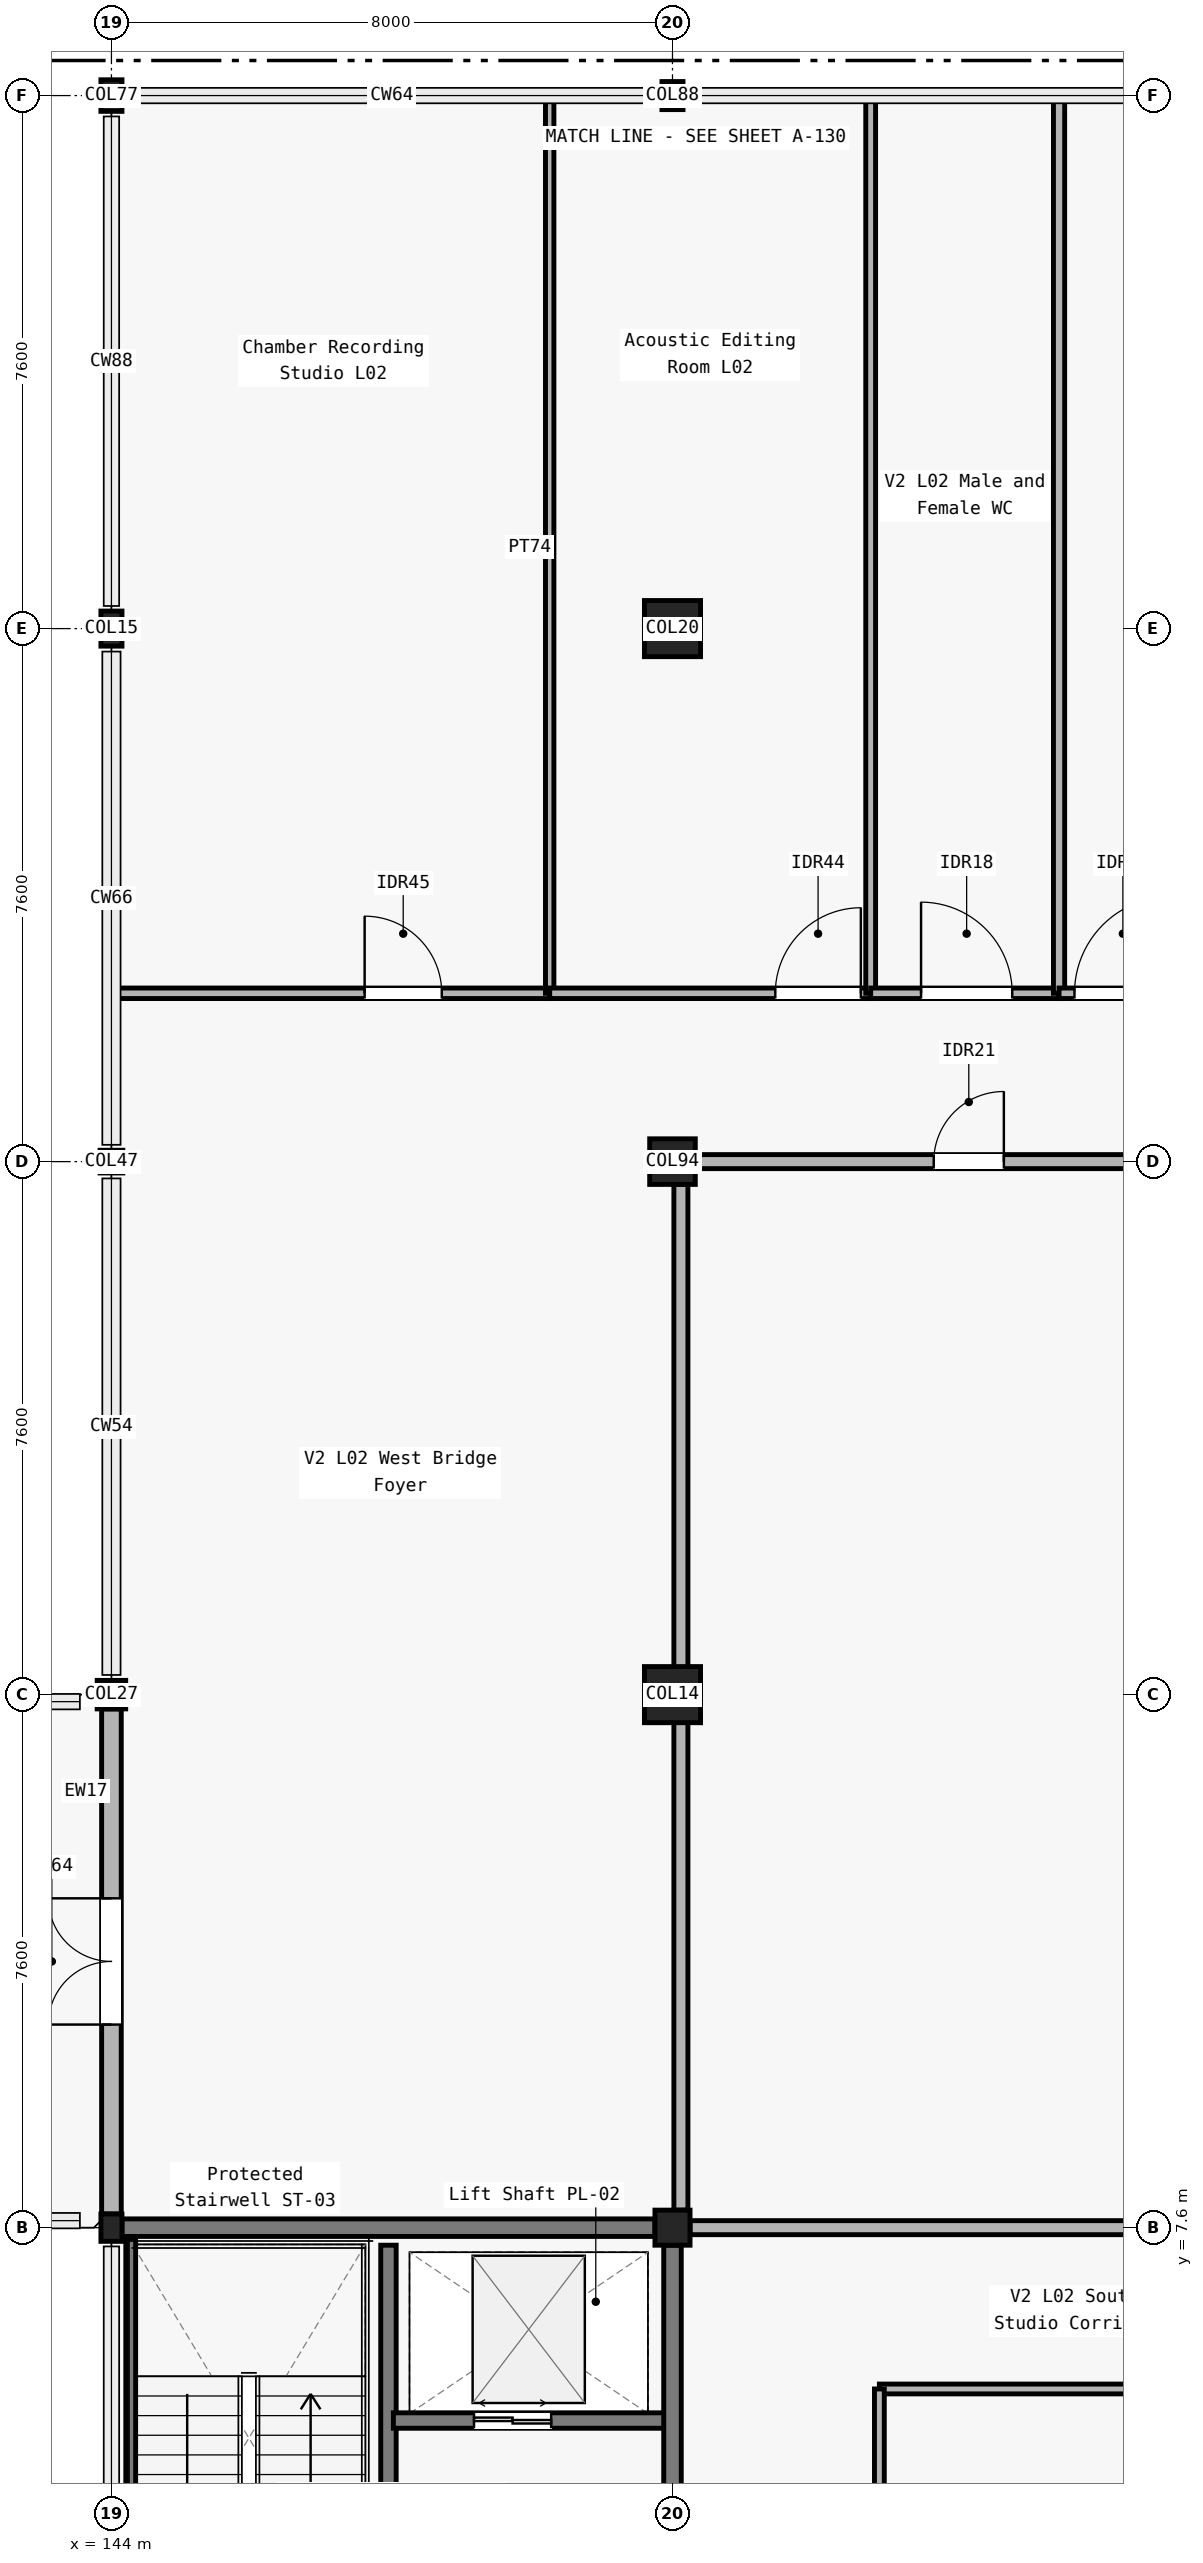
"""IFC4 building model, lengths in metres.
Left out: names, types, materials, properties, quantities, classifications, styles, units other than length and angle.
Written with IfcOpenShell. Run it as: python <this file> out.ifc"""

import sys

from ifc_helpers import new_model, si_unit, direction, frame, frame_2d, origin, origin_2d, place, context, subcontext, project, spatial, rectangle, circle, hollow_circle, i_section, extrude, element, fill, save


model = new_model("IFC4")
c1 = context("Model", 3, precision=1e-05, world=origin(), true_north=direction((0.0, 1.0)))
c2 = subcontext(c1, "Body", "Model", "MODEL_VIEW")
j1 = project(units=[si_unit("LENGTHUNIT", "METRE"), si_unit("PLANEANGLEUNIT", "RADIAN")], contexts=[c1])
p1 = place(None, origin())
s1 = spatial("IfcSite", under=j1, at=p1, CompositionType="ELEMENT")
p2 = place(p1, origin())
s2 = spatial("IfcBuilding", under=s1, at=p2, CompositionType="ELEMENT")
p3 = place(p2, frame((0.0, 0.0, 10.2)))
s3 = spatial("IfcBuildingStorey", under=s2, at=p3, CompositionType="ELEMENT", Elevation=10.2)
p4 = place(p3, frame((144.0, 7.6, 0.0), z_axis=(0.0, 0.0, 1.0), x_axis=(1.0, 0.0, 0.0)))
e1 = element("IfcColumn", 1, at=p4, inside=s3, PredefinedType="COLUMN", context=c2, shape_type="SweptSolid", body=[
    extrude(i_section(OverallWidth=0.3, OverallDepth=0.39, WebThickness=0.011, FlangeThickness=0.019, FilletRadius=0.027, at=origin_2d()), origin(), (0.0, 0.0, 1.0), 4.8),
])
p5 = place(p3, frame((144.0, 15.2, 0.0), z_axis=(0.0, 0.0, 1.0), x_axis=(1.0, 0.0, 0.0)))
e2 = element("IfcColumn", 2, at=p5, inside=s3, PredefinedType="COLUMN", context=c2, shape_type="SweptSolid", body=[
    extrude(hollow_circle(Radius=0.203, WallThickness=0.02, at=origin_2d()), origin(), (0.0, 0.0, 1.0), 4.8),
])
p6 = place(p3, frame((144.0, 22.8, 0.0), z_axis=(0.0, 0.0, 1.0), x_axis=(1.0, 0.0, 0.0)))
e3 = element("IfcColumn", 3, at=p6, inside=s3, PredefinedType="COLUMN", context=c2, shape_type="SweptSolid", body=[
    extrude(hollow_circle(Radius=0.162, WallThickness=0.016, at=origin_2d()), origin(), (0.0, 0.0, 1.0), 4.8),
])
p7 = place(p3, frame((144.0, 30.4, 0.0), z_axis=(0.0, 0.0, 1.0), x_axis=(1.0, 0.0, 0.0)))
e4 = element("IfcColumn", 4, at=p7, inside=s3, PredefinedType="COLUMN", context=c2, shape_type="SweptSolid", body=[
    extrude(i_section(OverallWidth=0.3, OverallDepth=0.5, WebThickness=0.014, FlangeThickness=0.028, FilletRadius=0.027, at=origin_2d()), origin(), (0.0, 0.0, 1.0), 4.8),
])
p8 = place(p3, frame((144.0, 38.0, 0.0), z_axis=(0.0, 0.0, 1.0), x_axis=(1.0, 0.0, 0.0)))
e5 = element("IfcColumn", 5, at=p8, inside=s3, PredefinedType="COLUMN", context=c2, shape_type="SweptSolid", body=[
    extrude(i_section(OverallWidth=0.3, OverallDepth=0.45, WebThickness=0.014, FlangeThickness=0.026, FilletRadius=0.027, at=origin_2d()), origin(), (0.0, 0.0, 1.0), 4.8),
])
p9 = place(p3, frame((152.0, 7.6, 0.0), z_axis=(0.0, 0.0, 1.0), x_axis=(1.0, 0.0, 0.0)))
e6 = element("IfcColumn", 6, at=p9, inside=s3, PredefinedType="COLUMN", context=c2, shape_type="SweptSolid", body=[
    extrude(rectangle(XDim=0.5, YDim=0.5, at=origin_2d()), origin(), (0.0, 0.0, 1.0), 4.8),
])
p10 = place(p3, frame((152.0, 15.2, 0.0), z_axis=(0.0, 0.0, 1.0), x_axis=(1.0, 0.0, 0.0)))
e7 = element("IfcColumn", 7, at=p10, inside=s3, PredefinedType="COLUMN", context=c2, shape_type="SweptSolid", body=[
    extrude(circle(Radius=0.4, at=origin_2d()), origin(), (0.0, 0.0, 1.0), 4.8),
])
p11 = place(p3, frame((152.0, 22.8, 0.0), z_axis=(0.0, 0.0, 1.0), x_axis=(1.0, 0.0, 0.0)))
e8 = element("IfcColumn", 8, at=p11, inside=s3, PredefinedType="COLUMN", context=c2, shape_type="SweptSolid", body=[
    extrude(circle(Radius=0.325, at=origin_2d()), origin(), (0.0, 0.0, 1.0), 4.8),
])
p12 = place(p3, frame((152.0, 30.4, 0.0), z_axis=(0.0, 0.0, 1.0), x_axis=(1.0, 0.0, 0.0)))
e9 = element("IfcColumn", 9, at=p12, inside=s3, PredefinedType="COLUMN", context=c2, shape_type="SweptSolid", body=[
    extrude(rectangle(XDim=0.8, YDim=0.8, at=origin_2d()), origin(), (0.0, 0.0, 1.0), 4.8),
])
p13 = place(p3, frame((152.0, 38.0, 0.0), z_axis=(0.0, 0.0, 1.0), x_axis=(1.0, 0.0, 0.0)))
e10 = element("IfcColumn", 10, at=p13, inside=s3, PredefinedType="COLUMN", context=c2, shape_type="SweptSolid", body=[
    extrude(i_section(OverallWidth=0.3, OverallDepth=0.4, WebThickness=0.013, FlangeThickness=0.024, FilletRadius=0.027, at=origin_2d()), origin(), (0.0, 0.0, 1.0), 4.8),
])
p14 = place(p3, frame((144.0, 7.795, 0.0), z_axis=(0.0, 0.0, 1.0), x_axis=(0.0, 1.0, 0.0)))
e11 = element("IfcWall", 11, at=p14, inside=s3, PredefinedType="SOLIDWALL", context=c2, shape_type="SweptSolid", body=[
    extrude(rectangle(XDim=7.202, YDim=0.28, at=frame_2d((3.601, 0.0))), origin(), (0.0, 0.0, 1.0), 3.86),
])
p15 = place(p14, frame((2.701, 0.0, 0.0)))
e12 = element("IfcOpeningElement", 12, at=p15, cuts=e11, PredefinedType="OPENING", context=c2, shape_type="SweptSolid", body=[
    extrude(rectangle(XDim=1.8, YDim=2.25, at=frame_2d((0.9, 1.125))), frame((0.0, 0.15, 0.0), z_axis=(0.0, -1.0, 0.0), x_axis=(1.0, 0.0, 0.0)), (0.0, 0.0, 1.0), 0.3),
])
p16 = place(p3, frame((144.15, 7.6, 0.0), z_axis=(0.0, 0.0, 1.0), x_axis=(1.0, 0.0, 0.0)))
e13 = element("IfcWall", 13, at=p16, inside=s3, PredefinedType="SOLIDWALL", context=c2, shape_type="SweptSolid", body=[
    extrude(rectangle(XDim=7.6, YDim=0.25, at=frame_2d((3.8, 0.0))), origin(), (0.0, 0.0, 1.0), 3.655),
])
p17 = place(p3, frame((147.95, 0.25, 0.0), z_axis=(0.0, 0.0, 1.0), x_axis=(0.0, 1.0, 0.0)))
e14 = element("IfcWall", 14, at=p17, inside=s3, PredefinedType="SOLIDWALL", context=c2, shape_type="SweptSolid", body=[
    extrude(rectangle(XDim=7.1, YDim=0.22, at=frame_2d((3.55, 0.0))), origin(), (0.0, 0.0, 1.0), 4.52),
])
p18 = place(p17, frame((0.35, 0.0, 0.0)))
e15 = element("IfcOpeningElement", 15, at=p18, cuts=e14, PredefinedType="OPENING", context=c2, shape_type="SweptSolid", body=[
    extrude(rectangle(XDim=1.2, YDim=2.15, at=frame_2d((0.6, 1.075))), frame((0.0, 0.12, 0.0), z_axis=(0.0, -1.0, 0.0), x_axis=(1.0, 0.0, 0.0)), (0.0, 0.0, 1.0), 0.24),
])
p19 = place(p3, frame((148.02, 4.85, 0.0), z_axis=(0.0, 0.0, 1.0), x_axis=(1.0, 0.0, 0.0)))
e16 = element("IfcWall", 16, at=p19, inside=s3, PredefinedType="SOLIDWALL", context=c2, shape_type="SweptSolid", body=[
    extrude(rectangle(XDim=3.93, YDim=0.22, at=frame_2d((1.965, 0.0))), origin(), (0.0, 0.0, 1.0), 3.895),
])
p20 = place(p19, frame((1.15, 0.0, 0.0)))
e17 = element("IfcOpeningElement", 17, at=p20, cuts=e16, PredefinedType="OPENING", context=c2, shape_type="SweptSolid", body=[
    extrude(rectangle(XDim=1.1, YDim=2.2, at=frame_2d((0.55, 1.1))), frame((0.0, 0.12, 0.0), z_axis=(0.0, -1.0, 0.0), x_axis=(1.0, 0.0, 0.0)), (0.0, 0.0, 1.0), 0.24),
])
p21 = place(p3, frame((152.0, 0.195, 0.0), z_axis=(0.0, 0.0, 1.0), x_axis=(0.0, 1.0, 0.0)))
e18 = element("IfcWall", 18, at=p21, inside=s3, PredefinedType="SOLIDWALL", context=c2, shape_type="SweptSolid", body=[
    extrude(rectangle(XDim=7.155, YDim=0.25, at=frame_2d((3.578, 0.0))), origin(), (0.0, 0.0, 1.0), 3.745),
])
p22 = place(p21, frame((2.155, 0.0, 0.0)))
e19 = element("IfcOpeningElement", 19, at=p22, cuts=e18, PredefinedType="OPENING", context=c2, shape_type="SweptSolid", body=[
    extrude(rectangle(XDim=1.35, YDim=2.2, at=frame_2d((0.675, 1.1))), frame((0.0, 0.135, 0.0), z_axis=(0.0, -1.0, 0.0), x_axis=(1.0, 0.0, 0.0)), (0.0, 0.0, 1.0), 0.27),
])
p23 = place(p3, frame((152.325, 22.8, 0.0), z_axis=(0.0, 0.0, 1.0), x_axis=(1.0, 0.0, 0.0)))
e20 = element("IfcWall", 20, at=p23, inside=s3, PredefinedType="PARTITIONING", context=c2, shape_type="SweptSolid", body=[
    extrude(rectangle(XDim=23.375, YDim=0.2, at=frame_2d((11.688, 0.0))), origin(), (0.0, 0.0, 1.0), 3.56),
])
p24 = place(p23, frame((3.4, 0.0, 0.0)))
e21 = element("IfcOpeningElement", 21, at=p24, cuts=e20, PredefinedType="OPENING", context=c2, shape_type="SweptSolid", body=[
    extrude(rectangle(XDim=1.0, YDim=2.05, at=frame_2d((0.5, 1.025))), frame((0.0, 0.11, 0.0), z_axis=(0.0, -1.0, 0.0), x_axis=(1.0, 0.0, 0.0)), (0.0, 0.0, 1.0), 0.22),
])
p25 = place(p23, frame((18.8, 0.0, 0.0)))
e22 = element("IfcOpeningElement", 22, at=p25, cuts=e20, PredefinedType="OPENING", context=c2, shape_type="SweptSolid", body=[
    extrude(rectangle(XDim=0.9, YDim=2.1, at=frame_2d((0.45, 1.05))), frame((0.0, 0.11, 0.0), z_axis=(0.0, -1.0, 0.0), x_axis=(1.0, 0.0, 0.0)), (0.0, 0.0, 1.0), 0.22),
])
p26 = place(p3, frame((152.12, 7.85, 0.0), z_axis=(0.0, 0.0, 1.0), x_axis=(0.0, 1.0, 0.0)))
e23 = element("IfcWall", 23, at=p26, inside=s3, PredefinedType="PARTITIONING", context=c2, shape_type="SweptSolid", body=[
    extrude(rectangle(XDim=14.625, YDim=0.2, at=frame_2d((7.312, 0.0))), origin(), (0.0, 0.0, 1.0), 3.56),
])
p27 = place(p3, frame((152.25, 7.6, 0.0), z_axis=(0.0, 0.0, 1.0), x_axis=(1.0, 0.0, 0.0)))
e24 = element("IfcWall", 24, at=p27, inside=s3, PredefinedType="PARTITIONING", context=c2, shape_type="SweptSolid", body=[
    extrude(rectangle(XDim=23.35, YDim=0.2, at=frame_2d((11.675, 0.0))), origin(), (0.0, 0.0, 1.0), 3.56),
])
p28 = place(p3, frame((154.95, 5.3, 0.0), z_axis=(0.0, 0.0, 1.0), x_axis=(1.0, 0.0, 0.0)))
e25 = element("IfcWall", 25, at=p28, inside=s3, PredefinedType="PARTITIONING", context=c2, shape_type="SweptSolid", body=[
    extrude(rectangle(XDim=10.024, YDim=0.14, at=frame_2d((5.012, 0.0))), origin(), (0.0, 0.0, 1.0), 3.875),
])
p29 = place(p28, frame((8.804, 0.0, 0.0)))
e26 = element("IfcOpeningElement", 26, at=p29, cuts=e25, PredefinedType="OPENING", context=c2, shape_type="SweptSolid", body=[
    extrude(rectangle(XDim=1.08, YDim=2.1, at=frame_2d((0.54, 1.05))), frame((0.0, 0.08, 0.0), z_axis=(0.0, -1.0, 0.0), x_axis=(1.0, 0.0, 0.0)), (0.0, 0.0, 1.0), 0.16),
])
p30 = place(p3, frame((154.95, 0.08, 0.0), z_axis=(0.0, 0.0, 1.0), x_axis=(0.0, 1.0, 0.0)))
e27 = element("IfcWall", 27, at=p30, inside=s3, PredefinedType="PARTITIONING", context=c2, shape_type="SweptSolid", body=[
    extrude(rectangle(XDim=5.22, YDim=0.14, at=frame_2d((2.61, 0.0))), origin(), (0.0, 0.0, 1.0), 3.89),
])
p31 = place(p3, frame((144.08, 25.2, 0.0), z_axis=(0.0, 0.0, 1.0), x_axis=(1.0, 0.0, 0.0)))
e28 = element("IfcWall", 28, at=p31, inside=s3, PredefinedType="PARTITIONING", context=c2, shape_type="SweptSolid", body=[
    extrude(rectangle(XDim=6.169, YDim=0.15, at=frame_2d((3.084, 0.0))), origin(), (0.0, 0.0, 1.0), 3.905),
])
p32 = place(p31, frame((3.53, 0.0, 0.0)))
e29 = element("IfcOpeningElement", 29, at=p32, cuts=e28, PredefinedType="OPENING", context=c2, shape_type="SweptSolid", body=[
    extrude(rectangle(XDim=1.1, YDim=2.15, at=frame_2d((0.55, 1.075))), frame((0.0, 0.085, 0.0), z_axis=(0.0, -1.0, 0.0), x_axis=(1.0, 0.0, 0.0)), (0.0, 0.0, 1.0), 0.17),
])
p33 = place(p3, frame((150.249, 25.2, 0.0), z_axis=(0.0, 0.0, 1.0), x_axis=(0.0, 1.0, 0.0)))
e30 = element("IfcWall", 30, at=p33, inside=s3, PredefinedType="PARTITIONING", context=c2, shape_type="SweptSolid", body=[
    extrude(rectangle(XDim=12.72, YDim=0.12, at=frame_2d((6.36, 0.0))), origin(), (0.0, 0.0, 1.0), 3.595),
])
p34 = place(p3, frame((150.249, 25.2, 0.0), z_axis=(0.0, 0.0, 1.0), x_axis=(1.0, 0.0, 0.0)))
e31 = element("IfcWall", 31, at=p34, inside=s3, PredefinedType="PARTITIONING", context=c2, shape_type="SweptSolid", body=[
    extrude(rectangle(XDim=4.577, YDim=0.15, at=frame_2d((2.289, 0.0))), origin(), (0.0, 0.0, 1.0), 3.745),
])
p35 = place(p34, frame((3.217, 0.0, 0.0)))
e32 = element("IfcOpeningElement", 32, at=p35, cuts=e31, PredefinedType="OPENING", context=c2, shape_type="SweptSolid", body=[
    extrude(rectangle(XDim=1.22, YDim=2.15, at=frame_2d((0.61, 1.075))), frame((0.0, 0.085, 0.0), z_axis=(0.0, -1.0, 0.0), x_axis=(1.0, 0.0, 0.0)), (0.0, 0.0, 1.0), 0.17),
])
p36 = place(p3, frame((154.826, 25.2, 0.0), z_axis=(0.0, 0.0, 1.0), x_axis=(0.0, 1.0, 0.0)))
e33 = element("IfcWall", 33, at=p36, inside=s3, PredefinedType="PARTITIONING", context=c2, shape_type="SweptSolid", body=[
    extrude(rectangle(XDim=12.72, YDim=0.14, at=frame_2d((6.36, 0.0))), origin(), (0.0, 0.0, 1.0), 3.77),
])
p37 = place(p3, frame((154.826, 25.2, 0.0), z_axis=(0.0, 0.0, 1.0), x_axis=(1.0, 0.0, 0.0)))
e34 = element("IfcWall", 34, at=p37, inside=s3, PredefinedType="PARTITIONING", context=c2, shape_type="SweptSolid", body=[
    extrude(rectangle(XDim=2.686, YDim=0.15, at=frame_2d((1.343, 0.0))), origin(), (0.0, 0.0, 1.0), 3.955),
])
p38 = place(p37, frame((0.719, 0.0, 0.0)))
e35 = element("IfcOpeningElement", 35, at=p38, cuts=e34, PredefinedType="OPENING", context=c2, shape_type="SweptSolid", body=[
    extrude(rectangle(XDim=1.3, YDim=2.2, at=frame_2d((0.65, 1.1))), frame((0.0, 0.085, 0.0), z_axis=(0.0, -1.0, 0.0), x_axis=(1.0, 0.0, 0.0)), (0.0, 0.0, 1.0), 0.17),
])
p39 = place(p3, frame((157.512, 25.2, 0.0), z_axis=(0.0, 0.0, 1.0), x_axis=(0.0, 1.0, 0.0)))
e36 = element("IfcWall", 36, at=p39, inside=s3, PredefinedType="PARTITIONING", context=c2, shape_type="SweptSolid", body=[
    extrude(rectangle(XDim=12.72, YDim=0.16, at=frame_2d((6.36, 0.0))), origin(), (0.0, 0.0, 1.0), 3.77),
])
p40 = place(p3, frame((157.512, 25.2, 0.0), z_axis=(0.0, 0.0, 1.0), x_axis=(1.0, 0.0, 0.0)))
e37 = element("IfcWall", 37, at=p40, inside=s3, PredefinedType="PARTITIONING", context=c2, shape_type="SweptSolid", body=[
    extrude(rectangle(XDim=2.488, YDim=0.15, at=frame_2d((1.244, 0.0))), origin(), (0.0, 0.0, 1.0), 3.695),
])
p41 = place(p40, frame((0.22, 0.0, 0.0)))
e38 = element("IfcOpeningElement", 38, at=p41, cuts=e37, PredefinedType="OPENING", context=c2, shape_type="SweptSolid", body=[
    extrude(rectangle(XDim=1.38, YDim=2.2, at=frame_2d((0.69, 1.1))), frame((0.0, 0.085, 0.0), z_axis=(0.0, -1.0, 0.0), x_axis=(1.0, 0.0, 0.0)), (0.0, 0.0, 1.0), 0.17),
])
p42 = place(p3, frame((144.275, 0.15, 0.0), z_axis=(0.0, 0.0, 1.0), x_axis=(0.0, 1.0, 0.0)))
e39 = element("IfcWall", 39, at=p42, inside=s3, PredefinedType="SOLIDWALL", context=c2, shape_type="SweptSolid", body=[
    extrude(rectangle(XDim=7.3, YDim=0.14, at=frame_2d((3.65, 0.0))), origin(), (0.0, 0.0, 1.0), 4.52),
])
p43 = place(p15, origin())
e40 = element("IfcDoor", 40, at=p43, inside=s3, OperationType="DOUBLE_DOOR_SINGLE_SWING", PredefinedType="DOOR", context=c2, shape_type="SweptSolid", body=[
    extrude(rectangle(XDim=1.8, YDim=2.25, at=frame_2d((0.9, 1.125))), frame((0.0, 0.025, 0.0), z_axis=(0.0, -1.0, 0.0), x_axis=(1.0, 0.0, 0.0)), (0.0, 0.0, 1.0), 0.05),
])
fill(e12, e40)
p44 = place(p20, origin())
e41 = element("IfcDoor", 41, at=p44, inside=s3, OperationType="DOUBLE_DOOR_SLIDING", PredefinedType="DOOR", context=c2, shape_type="SweptSolid", body=[
    extrude(rectangle(XDim=1.1, YDim=2.2, at=frame_2d((0.55, 1.1))), frame((0.0, 0.025, 0.0), z_axis=(0.0, -1.0, 0.0), x_axis=(1.0, 0.0, 0.0)), (0.0, 0.0, 1.0), 0.05),
])
fill(e17, e41)
p45 = place(p24, origin())
e42 = element("IfcDoor", 42, at=p45, inside=s3, OperationType="SINGLE_SWING_RIGHT", PredefinedType="DOOR", context=c2, shape_type="SweptSolid", body=[
    extrude(rectangle(XDim=1.0, YDim=2.05, at=frame_2d((0.5, 1.025))), frame((0.0, 0.025, 0.0), z_axis=(0.0, -1.0, 0.0), x_axis=(1.0, 0.0, 0.0)), (0.0, 0.0, 1.0), 0.05),
])
fill(e21, e42)
p46 = place(p32, origin())
e43 = element("IfcDoor", 43, at=p46, inside=s3, OperationType="SINGLE_SWING_LEFT", PredefinedType="DOOR", context=c2, shape_type="SweptSolid", body=[
    extrude(rectangle(XDim=1.1, YDim=2.15, at=frame_2d((0.55, 1.075))), frame((0.0, 0.025, 0.0), z_axis=(0.0, -1.0, 0.0), x_axis=(1.0, 0.0, 0.0)), (0.0, 0.0, 1.0), 0.05),
])
fill(e29, e43)
p47 = place(p35, origin())
e44 = element("IfcDoor", 44, at=p47, inside=s3, OperationType="SINGLE_SWING_RIGHT", PredefinedType="DOOR", context=c2, shape_type="SweptSolid", body=[
    extrude(rectangle(XDim=1.22, YDim=2.15, at=frame_2d((0.61, 1.075))), frame((0.0, 0.025, 0.0), z_axis=(0.0, -1.0, 0.0), x_axis=(1.0, 0.0, 0.0)), (0.0, 0.0, 1.0), 0.05),
])
fill(e32, e44)
p48 = place(p38, origin())
e45 = element("IfcDoor", 45, at=p48, inside=s3, OperationType="SINGLE_SWING_LEFT", PredefinedType="DOOR", context=c2, shape_type="SweptSolid", body=[
    extrude(rectangle(XDim=1.3, YDim=2.2, at=frame_2d((0.65, 1.1))), frame((0.0, 0.025, 0.0), z_axis=(0.0, -1.0, 0.0), x_axis=(1.0, 0.0, 0.0)), (0.0, 0.0, 1.0), 0.05),
])
fill(e35, e45)
p49 = place(p41, origin())
e46 = element("IfcDoor", 46, at=p49, inside=s3, OperationType="SINGLE_SWING_RIGHT", PredefinedType="DOOR", context=c2, shape_type="SweptSolid", body=[
    extrude(rectangle(XDim=1.38, YDim=2.2, at=frame_2d((0.69, 1.1))), frame((0.0, 0.025, 0.0), z_axis=(0.0, -1.0, 0.0), x_axis=(1.0, 0.0, 0.0)), (0.0, 0.0, 1.0), 0.05),
])
fill(e38, e46)
save(model, sys.argv[1])
